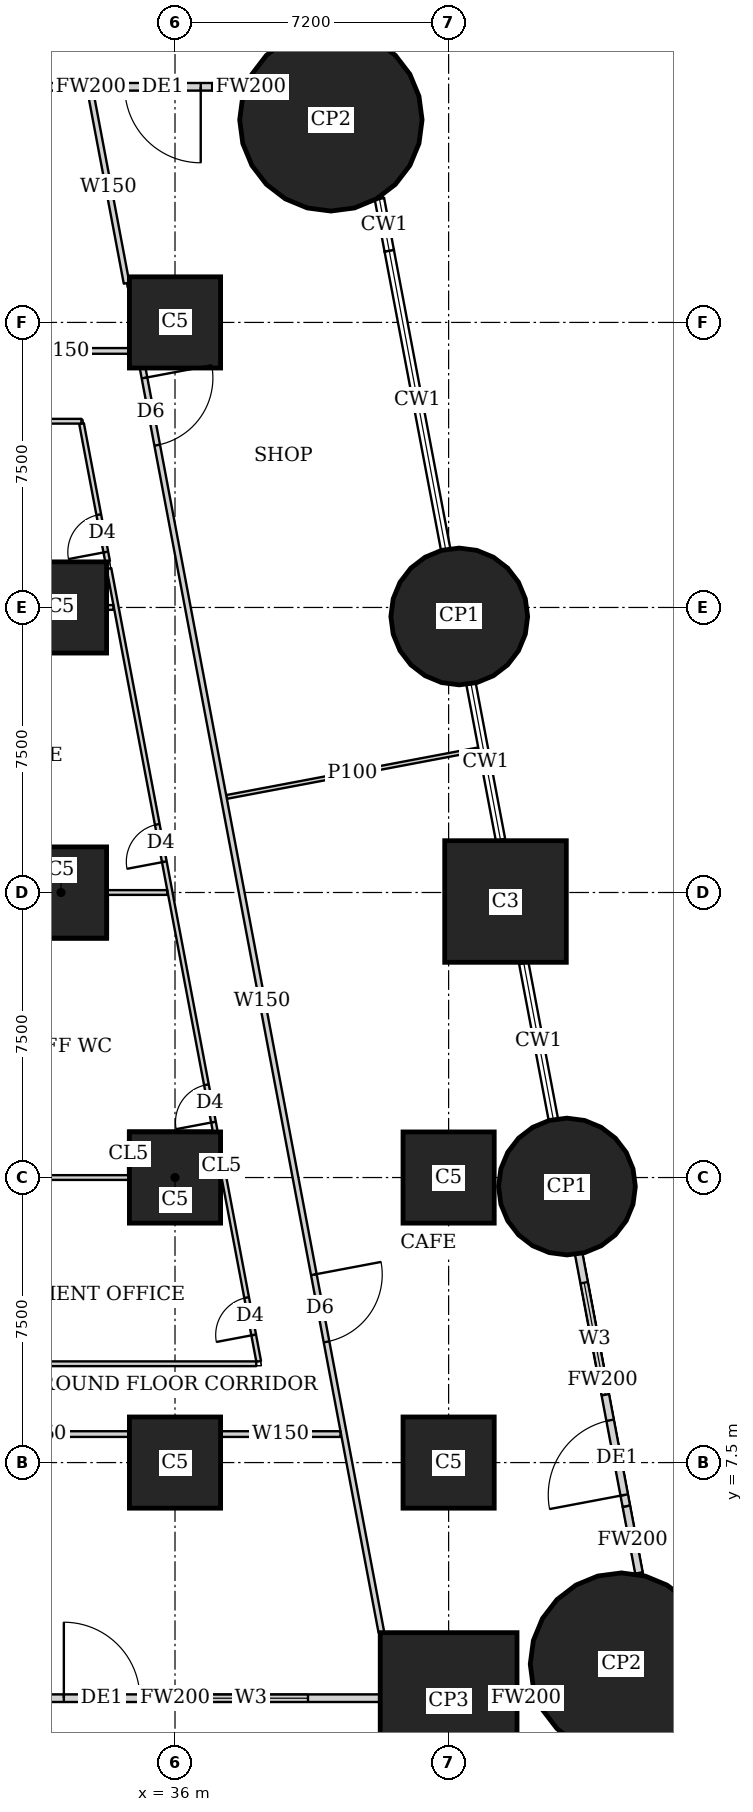
"""IFC4 building model, lengths in metres.
Left out: names, types, materials, properties, quantities, classifications, styles, units other than length and angle.
Written with IfcOpenShell. Run it as: python <this file> out.ifc"""

import sys

from ifc_helpers import new_model, si_unit, direction, frame, frame_2d, origin, origin_2d, place, context, subcontext, project, spatial, rectangle, circle, extrude, element, fill, save


model = new_model("IFC4")
c1 = context("Model", 3, precision=1e-05, world=origin(), true_north=direction((0.0, 1.0)))
c2 = subcontext(c1, "Body", "Model", "MODEL_VIEW")
j1 = project(units=[si_unit("LENGTHUNIT", "METRE"), si_unit("PLANEANGLEUNIT", "RADIAN")], contexts=[c1])
p1 = place(None, origin())
s1 = spatial("IfcSite", under=j1, at=p1, CompositionType="ELEMENT")
p2 = place(p1, origin())
s2 = spatial("IfcBuilding", under=s1, at=p2, CompositionType="ELEMENT")
p3 = place(p2, origin())
s3 = spatial("IfcBuildingStorey", under=s2, at=p3, CompositionType="ELEMENT", Elevation=0.0)
p4 = place(p3, frame((43.2, 1.225, 0.0), z_axis=(0.0, 0.0, 1.0), x_axis=(1.0, 0.0, 0.0)))
e1 = element("IfcColumn", 1, at=p4, inside=s3, PredefinedType="COLUMN", context=c2, shape_type="SweptSolid", body=[
    extrude(rectangle(XDim=3.6, YDim=3.6, at=origin_2d()), origin(), (0.0, 0.0, 1.0), 5.6),
])
p5 = place(p3, frame((47.748, 2.197, 0.0), z_axis=(0.0, 0.0, 1.0), x_axis=(1.0, 0.0, 0.0)))
e2 = element("IfcColumn", 2, at=p5, inside=s3, PredefinedType="COLUMN", context=c2, shape_type="SweptSolid", body=[
    extrude(circle(Radius=2.4, at=origin_2d()), origin(), (0.0, 0.0, 1.0), 5.6),
])
for number, where, z_axis, x_axis in (
    (3, (36.0, 7.5, 0.0), (0.0, 0.0, 1.0), (1.0, 0.0, 0.0)),
    (4, (43.2, 7.5, 0.0), (0.0, 0.0, 1.0), (1.0, 0.0, 0.0)),
    (5, (36.0, 15.0, 0.0), (0.0, 0.0, 1.0), (1.0, 0.0, 0.0)),
    (6, (43.2, 15.0, 0.0), (0.0, 0.0, 1.0), (1.0, 0.0, 0.0)),
):
    element("IfcColumn", number, at=place(p3, frame(where, z_axis=z_axis, x_axis=x_axis)), inside=s3, PredefinedType="COLUMN", context=c2, shape_type="SweptSolid", body=[
        extrude(rectangle(XDim=2.4, YDim=2.4, at=origin_2d()), origin(), (0.0, 0.0, 1.0), 5.6),
    ])
p6 = place(p3, frame((46.314, 14.763, 0.0), z_axis=(0.0, 0.0, 1.0), x_axis=(1.0, 0.0, 0.0)))
e7 = element("IfcColumn", 7, at=p6, inside=s3, PredefinedType="COLUMN", context=c2, shape_type="SweptSolid", body=[
    extrude(circle(Radius=1.8, at=origin_2d()), origin(), (0.0, 0.0, 1.0), 5.6),
])
p7 = place(p3, frame((33.0, 22.5, 0.0), z_axis=(0.0, 0.0, 1.0), x_axis=(1.0, 0.0, 0.0)))
e8 = element("IfcColumn", 8, at=p7, inside=s3, PredefinedType="COLUMN", context=c2, shape_type="SweptSolid", body=[
    extrude(rectangle(XDim=2.4, YDim=2.4, at=origin_2d()), origin(), (0.0, 0.0, 1.0), 5.6),
])
p8 = place(p3, frame((44.697, 22.263, 0.0), z_axis=(0.0, 0.0, 1.0), x_axis=(1.0, 0.0, 0.0)))
e9 = element("IfcColumn", 9, at=p8, inside=s3, PredefinedType="COLUMN", context=c2, shape_type="SweptSolid", body=[
    extrude(rectangle(XDim=3.2, YDim=3.2, at=origin_2d()), origin(), (0.0, 0.0, 1.0), 5.6),
])
p9 = place(p3, frame((33.0, 30.0, 0.0), z_axis=(0.0, 0.0, 1.0), x_axis=(1.0, 0.0, 0.0)))
e10 = element("IfcColumn", 10, at=p9, inside=s3, PredefinedType="COLUMN", context=c2, shape_type="SweptSolid", body=[
    extrude(rectangle(XDim=2.4, YDim=2.4, at=origin_2d()), origin(), (0.0, 0.0, 1.0), 5.6),
])
p10 = place(p3, frame((43.48, 29.763, 0.0), z_axis=(0.0, 0.0, 1.0), x_axis=(1.0, 0.0, 0.0)))
e11 = element("IfcColumn", 11, at=p10, inside=s3, PredefinedType="COLUMN", context=c2, shape_type="SweptSolid", body=[
    extrude(circle(Radius=1.8, at=origin_2d()), origin(), (0.0, 0.0, 1.0), 5.6),
])
p11 = place(p3, frame((36.0, 37.5, 0.0), z_axis=(0.0, 0.0, 1.0), x_axis=(1.0, 0.0, 0.0)))
e12 = element("IfcColumn", 12, at=p11, inside=s3, PredefinedType="COLUMN", context=c2, shape_type="SweptSolid", body=[
    extrude(rectangle(XDim=2.4, YDim=2.4, at=origin_2d()), origin(), (0.0, 0.0, 1.0), 5.6),
])
p12 = place(p3, frame((40.102, 42.83, 0.0), z_axis=(0.0, 0.0, 1.0), x_axis=(1.0, 0.0, 0.0)))
e13 = element("IfcColumn", 13, at=p12, inside=s3, PredefinedType="COLUMN", context=c2, shape_type="SweptSolid", body=[
    extrude(circle(Radius=2.4, at=origin_2d()), origin(), (0.0, 0.0, 1.0), 5.6),
])
p13 = place(p3, frame((30.601, 1.3, 0.0), z_axis=(0.0, 0.0, 1.0), x_axis=(1.0, 0.0, 0.0)))
e14 = element("IfcWall", 14, at=p13, inside=s3, PredefinedType="SOLIDWALL", context=c2, shape_type="SweptSolid", body=[
    extrude(rectangle(XDim=10.798, YDim=0.2, at=frame_2d((5.399, 0.0))), origin(), (0.0, 0.0, 1.0), 3.5),
])
p14 = place(p13, frame((2.474, 0.0, 0.0)))
e15 = element("IfcOpeningElement", 15, at=p14, cuts=e14, PredefinedType="OPENING", context=c2, shape_type="SweptSolid", body=[
    extrude(rectangle(XDim=2.0, YDim=2.4, at=frame_2d((1.0, 1.2))), frame((0.0, 0.11, 0.0), z_axis=(0.0, -1.0, 0.0), x_axis=(1.0, 0.0, 0.0)), (0.0, 0.0, 1.0), 0.22),
])
p15 = place(p13, frame((5.899, 0.0, 0.3)))
e16 = element("IfcOpeningElement", 16, at=p15, cuts=e14, PredefinedType="OPENING", context=c2, shape_type="SweptSolid", body=[
    extrude(rectangle(XDim=3.0, YDim=3.1, at=frame_2d((1.5, 1.55))), frame((0.0, 0.11, 0.0), z_axis=(0.0, -1.0, 0.0), x_axis=(1.0, 0.0, 0.0)), (0.0, 0.0, 1.0), 0.22),
])
p16 = place(p3, frame((45.001, 1.3, 0.0), z_axis=(0.0, 0.0, 1.0), x_axis=(1.0, 0.0, 0.0)))
e17 = element("IfcWall", 17, at=p16, inside=s3, PredefinedType="SOLIDWALL", context=c2, shape_type="SweptSolid", body=[
    extrude(rectangle(XDim=0.474, YDim=0.2, at=frame_2d((0.237, 0.0))), origin(), (0.0, 0.0, 1.0), 5.3),
])
p17 = place(p3, frame((48.209, 4.597, 0.0), z_axis=(0.0, 0.0, 1.0), x_axis=(-0.18578117006, 0.982591144297, 0.0)))
e18 = element("IfcWall", 18, at=p17, inside=s3, PredefinedType="SOLIDWALL", context=c2, shape_type="SweptSolid", body=[
    extrude(rectangle(XDim=1.787, YDim=0.2, at=frame_2d((0.894, 0.0))), origin(), (0.0, 0.0, 1.0), 5.3),
])
p18 = place(p3, frame((47.877, 6.353, 0.0), z_axis=(0.0, 0.0, 1.0), x_axis=(-0.185530368296, 0.982638530916, 0.0)))
e19 = element("IfcWall", 19, at=p18, inside=s3, PredefinedType="SOLIDWALL", context=c2, shape_type="SweptSolid", body=[
    extrude(rectangle(XDim=6.753, YDim=0.2, at=frame_2d((3.376, 0.0))), origin(), (0.0, 0.0, 1.0), 3.5),
])
p19 = place(p18, frame((0.3, 0.0, 0.0)))
e20 = element("IfcOpeningElement", 20, at=p19, cuts=e19, PredefinedType="OPENING", context=c2, shape_type="SweptSolid", body=[
    extrude(rectangle(XDim=2.0, YDim=2.4, at=frame_2d((1.0, 1.2))), frame((0.0, 0.11, 0.0), z_axis=(0.0, -1.0, 0.0), x_axis=(1.0, 0.0, 0.0)), (0.0, 0.0, 1.0), 0.22),
])
p20 = place(p18, frame((2.983, 0.0, 0.3)))
e21 = element("IfcOpeningElement", 21, at=p20, cuts=e19, PredefinedType="OPENING", context=c2, shape_type="SweptSolid", body=[
    extrude(rectangle(XDim=3.0, YDim=3.1, at=frame_2d((1.5, 1.55))), frame((0.0, 0.11, 0.0), z_axis=(0.0, -1.0, 0.0), x_axis=(1.0, 0.0, 0.0)), (0.0, 0.0, 1.0), 0.22),
])
p21 = place(p3, frame((37.82, 43.7, 0.0), z_axis=(0.0, 0.0, 1.0), x_axis=(-1.0, 0.0, 0.0)))
e22 = element("IfcWall", 22, at=p21, inside=s3, PredefinedType="SOLIDWALL", context=c2, shape_type="SweptSolid", body=[
    extrude(rectangle(XDim=0.843, YDim=0.2, at=frame_2d((0.421, 0.0))), origin(), (0.0, 0.0, 1.0), 5.3),
])
p22 = place(p3, frame((36.977, 43.7, 0.0), z_axis=(0.0, 0.0, 1.0), x_axis=(-1.0, 0.0, 0.0)))
e23 = element("IfcWall", 23, at=p22, inside=s3, PredefinedType="SOLIDWALL", context=c2, shape_type="SweptSolid", body=[
    extrude(rectangle(XDim=6.376, YDim=0.2, at=frame_2d((3.188, 0.0))), origin(), (0.0, 0.0, 1.0), 3.5),
])
p23 = place(p22, frame((0.3, 0.0, 0.0)))
e24 = element("IfcOpeningElement", 24, at=p23, cuts=e23, PredefinedType="OPENING", context=c2, shape_type="SweptSolid", body=[
    extrude(rectangle(XDim=2.0, YDim=2.4, at=frame_2d((1.0, 1.2))), frame((0.0, 0.11, 0.0), z_axis=(0.0, -1.0, 0.0), x_axis=(1.0, 0.0, 0.0)), (0.0, 0.0, 1.0), 0.22),
])
p24 = place(p3, frame((40.355, 8.25, 0.0), z_axis=(0.0, 0.0, 1.0), x_axis=(-1.0, 0.0, 0.0)))
e25 = element("IfcWall", 25, at=p24, inside=s3, PredefinedType="SOLIDWALL", context=c2, shape_type="SweptSolid", body=[
    extrude(rectangle(XDim=3.154, YDim=0.15, at=frame_2d((1.577, 0.0))), origin(), (0.0, 0.0, 1.0), 3.7),
])
p25 = place(p3, frame((34.799, 8.25, 0.0), z_axis=(0.0, 0.0, 1.0), x_axis=(-1.0, 0.0, 0.0)))
e26 = element("IfcWall", 26, at=p25, inside=s3, PredefinedType="SOLIDWALL", context=c2, shape_type="SweptSolid", body=[
    extrude(rectangle(XDim=4.798, YDim=0.15, at=frame_2d((2.399, 0.0))), origin(), (0.0, 0.0, 1.0), 3.7),
])
p26 = place(p3, frame((30.001, 36.75, 0.0), z_axis=(0.0, 0.0, 1.0), x_axis=(1.0, 0.0, 0.0)))
e27 = element("IfcWall", 27, at=p26, inside=s3, PredefinedType="SOLIDWALL", context=c2, shape_type="SweptSolid", body=[
    extrude(rectangle(XDim=4.798, YDim=0.15, at=frame_2d((2.399, 0.0))), origin(), (0.0, 0.0, 1.0), 3.7),
])
p27 = place(p26, frame((0.15, 0.0, 0.0)))
e28 = element("IfcOpeningElement", 28, at=p27, cuts=e27, PredefinedType="OPENING", context=c2, shape_type="SweptSolid", body=[
    extrude(rectangle(XDim=1.8, YDim=2.1, at=frame_2d((0.9, 1.05))), frame((0.0, 0.085, 0.0), z_axis=(0.0, -1.0, 0.0), x_axis=(1.0, 0.0, 0.0)), (0.0, 0.0, 1.0), 0.17),
])
p28 = place(p3, frame((33.769, 43.6, 0.0), z_axis=(0.0, 0.0, 1.0), x_axis=(0.185588997398, -0.98262745944, 0.0)))
e29 = element("IfcWall", 29, at=p28, inside=s3, PredefinedType="SOLIDWALL", context=c2, shape_type="SweptSolid", body=[
    extrude(rectangle(XDim=5.157, YDim=0.15, at=frame_2d((2.578, 0.0))), origin(), (0.0, 0.0, 1.0), 3.5),
])
p29 = place(p3, frame((35.151, 36.285, 0.0), z_axis=(0.0, 0.0, 1.0), x_axis=(0.185575970071, -0.982629919823, 0.0)))
e30 = element("IfcWall", 30, at=p29, inside=s3, PredefinedType="SOLIDWALL", context=c2, shape_type="SweptSolid", body=[
    extrude(rectangle(XDim=33.841, YDim=0.15, at=frame_2d((16.92, 0.0))), origin(), (0.0, 0.0, 1.0), 3.7),
])
p30 = place(p29, frame((0.25, 0.0, 0.0)))
e31 = element("IfcOpeningElement", 31, at=p30, cuts=e30, PredefinedType="OPENING", context=c2, shape_type="SweptSolid", body=[
    extrude(rectangle(XDim=1.8, YDim=2.1, at=frame_2d((0.9, 1.05))), frame((0.0, 0.085, 0.0), z_axis=(0.0, -1.0, 0.0), x_axis=(1.0, 0.0, 0.0)), (0.0, 0.0, 1.0), 0.17),
])
p31 = place(p29, frame((24.261, 0.0, 0.0)))
e32 = element("IfcOpeningElement", 32, at=p31, cuts=e30, PredefinedType="OPENING", context=c2, shape_type="SweptSolid", body=[
    extrude(rectangle(XDim=1.8, YDim=2.1, at=frame_2d((0.9, 1.05))), frame((0.0, 0.085, 0.0), z_axis=(0.0, -1.0, 0.0), x_axis=(1.0, 0.0, 0.0)), (0.0, 0.0, 1.0), 0.17),
])
p32 = place(p3, frame((43.988, 26.267, 0.0), z_axis=(0.0, 0.0, 1.0), x_axis=(-0.982612004876, -0.185670805118, 0.0)))
e33 = element("IfcWall", 33, at=p32, inside=s3, PredefinedType="PARTITIONING", context=c2, shape_type="SweptSolid", body=[
    extrude(rectangle(XDim=6.75, YDim=0.1, at=frame_2d((3.375, 0.0))), origin(), (0.0, 0.0, 1.0), 3.5),
])
p33 = place(p3, frame((28.95, 10.1, 0.0), z_axis=(0.0, 0.0, 1.0), x_axis=(1.0, 0.0, 0.0)))
e34 = element("IfcWall", 34, at=p33, inside=s3, PredefinedType="PARTITIONING", context=c2, shape_type="SweptSolid", body=[
    extrude(rectangle(XDim=9.188, YDim=0.125, at=frame_2d((4.594, 0.0))), origin(), (0.0, 0.0, 1.0), 3.3),
])
p34 = place(p3, frame((28.95, 34.9, 0.0), z_axis=(0.0, 0.0, 1.0), x_axis=(1.0, 0.0, 0.0)))
e35 = element("IfcWall", 35, at=p34, inside=s3, PredefinedType="PARTITIONING", context=c2, shape_type="SweptSolid", body=[
    extrude(rectangle(XDim=4.588, YDim=0.125, at=frame_2d((2.294, 0.0))), origin(), (0.0, 0.0, 1.0), 3.3),
])
p35 = place(p3, frame((38.202, 10.163, 0.0), z_axis=(0.0, 0.0, 1.0), x_axis=(-0.185539561605, 0.982636795097, 0.0)))
e36 = element("IfcWall", 36, at=p35, inside=s3, PredefinedType="PARTITIONING", context=c2, shape_type="SweptSolid", body=[
    extrude(rectangle(XDim=5.066, YDim=0.125, at=frame_2d((2.533, 0.0))), origin(), (0.0, 0.0, 1.0), 3.7),
])
p36 = place(p35, frame((0.708, 0.0, 0.0)))
e37 = element("IfcOpeningElement", 37, at=p36, cuts=e36, PredefinedType="OPENING", context=c2, shape_type="SweptSolid", body=[
    extrude(rectangle(XDim=1.0, YDim=2.1, at=frame_2d((0.5, 1.05))), frame((0.0, 0.073, 0.0), z_axis=(0.0, -1.0, 0.0), x_axis=(1.0, 0.0, 0.0)), (0.0, 0.0, 1.0), 0.145),
])
p37 = place(p3, frame((37.059, 16.213, 0.0), z_axis=(0.0, 0.0, 1.0), x_axis=(-0.185585225745, 0.982628171785, 0.0)))
e38 = element("IfcWall", 38, at=p37, inside=s3, PredefinedType="PARTITIONING", context=c2, shape_type="SweptSolid", body=[
    extrude(rectangle(XDim=15.072, YDim=0.125, at=frame_2d((7.536, 0.0))), origin(), (0.0, 0.0, 1.0), 3.7),
])
p38 = place(p37, frame((0.25, 0.0, 0.0)))
e39 = element("IfcOpeningElement", 39, at=p38, cuts=e38, PredefinedType="OPENING", context=c2, shape_type="SweptSolid", body=[
    extrude(rectangle(XDim=1.0, YDim=2.1, at=frame_2d((0.5, 1.05))), frame((0.0, 0.073, 0.0), z_axis=(0.0, -1.0, 0.0), x_axis=(1.0, 0.0, 0.0)), (0.0, 0.0, 1.0), 0.145),
])
p39 = place(p37, frame((7.221, 0.0, 0.0)))
e40 = element("IfcOpeningElement", 40, at=p39, cuts=e38, PredefinedType="OPENING", context=c2, shape_type="SweptSolid", body=[
    extrude(rectangle(XDim=1.0, YDim=2.1, at=frame_2d((0.5, 1.05))), frame((0.0, 0.073, 0.0), z_axis=(0.0, -1.0, 0.0), x_axis=(1.0, 0.0, 0.0)), (0.0, 0.0, 1.0), 0.145),
])
p40 = place(p3, frame((34.226, 31.213, 0.0), z_axis=(0.0, 0.0, 1.0), x_axis=(-0.185694811189, 0.982607468472, 0.0)))
e41 = element("IfcWall", 41, at=p40, inside=s3, PredefinedType="PARTITIONING", context=c2, shape_type="SweptSolid", body=[
    extrude(rectangle(XDim=3.689, YDim=0.125, at=frame_2d((1.845, 0.0))), origin(), (0.0, 0.0, 1.0), 5.3),
])
p41 = place(p40, frame((0.25, 0.0, 0.0)))
e42 = element("IfcOpeningElement", 42, at=p41, cuts=e41, PredefinedType="OPENING", context=c2, shape_type="SweptSolid", body=[
    extrude(rectangle(XDim=1.0, YDim=2.1, at=frame_2d((0.5, 1.05))), frame((0.0, 0.073, 0.0), z_axis=(0.0, -1.0, 0.0), x_axis=(1.0, 0.0, 0.0)), (0.0, 0.0, 1.0), 0.145),
])
p42 = place(p3, frame((29.25, 15.0, 0.0), z_axis=(0.0, 0.0, 1.0), x_axis=(1.0, 0.0, 0.0)))
e43 = element("IfcWall", 43, at=p42, inside=s3, PredefinedType="PARTITIONING", context=c2, shape_type="SweptSolid", body=[
    extrude(rectangle(XDim=5.549, YDim=0.125, at=frame_2d((2.774, 0.0))), origin(), (0.0, 0.0, 1.0), 5.3),
])
p43 = place(p3, frame((34.201, 22.5, 0.0), z_axis=(0.0, 0.0, 1.0), x_axis=(1.0, 0.0, 0.0)))
e44 = element("IfcWall", 44, at=p43, inside=s3, PredefinedType="PARTITIONING", context=c2, shape_type="SweptSolid", body=[
    extrude(rectangle(XDim=1.595, YDim=0.125, at=frame_2d((0.797, 0.0))), origin(), (0.0, 0.0, 1.0), 3.7),
])
p44 = place(p3, frame((34.201, 30.0, 0.0), z_axis=(0.0, 0.0, 1.0), x_axis=(1.0, 0.0, 0.0)))
e45 = element("IfcWall", 45, at=p44, inside=s3, PredefinedType="PARTITIONING", context=c2, shape_type="SweptSolid", body=[
    extrude(rectangle(XDim=0.178, YDim=0.125, at=frame_2d((0.089, 0.0))), origin(), (0.0, 0.0, 1.0), 3.7),
])
p45 = place(p14, origin())
e46 = element("IfcDoor", 46, at=p45, inside=s3, OperationType="DOUBLE_DOOR_SINGLE_SWING", PredefinedType="DOOR", context=c2, shape_type="SweptSolid", body=[
    extrude(rectangle(XDim=2.0, YDim=2.4, at=frame_2d((1.0, 1.2))), frame((0.0, 0.025, 0.0), z_axis=(0.0, -1.0, 0.0), x_axis=(1.0, 0.0, 0.0)), (0.0, 0.0, 1.0), 0.05),
])
fill(e15, e46)
p46 = place(p15, origin())
e47 = element("IfcWindow", 47, at=p46, inside=s3, PartitioningType="SINGLE_PANEL", PredefinedType="WINDOW", context=c2, shape_type="SweptSolid", body=[
    extrude(rectangle(XDim=3.0, YDim=3.1, at=frame_2d((1.5, 1.55))), frame((0.0, 0.03, 0.0), z_axis=(0.0, -1.0, 0.0), x_axis=(1.0, 0.0, 0.0)), (0.0, 0.0, 1.0), 0.06),
])
fill(e16, e47)
p47 = place(p19, origin())
e48 = element("IfcDoor", 48, at=p47, inside=s3, OperationType="DOUBLE_DOOR_SINGLE_SWING", PredefinedType="DOOR", context=c2, shape_type="SweptSolid", body=[
    extrude(rectangle(XDim=2.0, YDim=2.4, at=frame_2d((1.0, 1.2))), frame((0.0, 0.025, 0.0), z_axis=(0.0, -1.0, 0.0), x_axis=(1.0, 0.0, 0.0)), (0.0, 0.0, 1.0), 0.05),
])
fill(e20, e48)
p48 = place(p20, origin())
e49 = element("IfcWindow", 49, at=p48, inside=s3, PartitioningType="SINGLE_PANEL", PredefinedType="WINDOW", context=c2, shape_type="SweptSolid", body=[
    extrude(rectangle(XDim=3.0, YDim=3.1, at=frame_2d((1.5, 1.55))), frame((0.0, 0.03, 0.0), z_axis=(0.0, -1.0, 0.0), x_axis=(1.0, 0.0, 0.0)), (0.0, 0.0, 1.0), 0.06),
])
fill(e21, e49)
p49 = place(p23, origin())
e50 = element("IfcDoor", 50, at=p49, inside=s3, OperationType="DOUBLE_DOOR_SINGLE_SWING", PredefinedType="DOOR", context=c2, shape_type="SweptSolid", body=[
    extrude(rectangle(XDim=2.0, YDim=2.4, at=frame_2d((1.0, 1.2))), frame((0.0, 0.025, 0.0), z_axis=(0.0, -1.0, 0.0), x_axis=(1.0, 0.0, 0.0)), (0.0, 0.0, 1.0), 0.05),
])
fill(e24, e50)
p50 = place(p30, origin())
e51 = element("IfcDoor", 51, at=p50, inside=s3, OperationType="DOUBLE_DOOR_SINGLE_SWING", PredefinedType="DOOR", context=c2, shape_type="SweptSolid", body=[
    extrude(rectangle(XDim=1.8, YDim=2.1, at=frame_2d((0.9, 1.05))), frame((0.0, 0.025, 0.0), z_axis=(0.0, -1.0, 0.0), x_axis=(1.0, 0.0, 0.0)), (0.0, 0.0, 1.0), 0.05),
])
fill(e31, e51)
p51 = place(p31, origin())
e52 = element("IfcDoor", 52, at=p51, inside=s3, OperationType="DOUBLE_DOOR_SINGLE_SWING", PredefinedType="DOOR", context=c2, shape_type="SweptSolid", body=[
    extrude(rectangle(XDim=1.8, YDim=2.1, at=frame_2d((0.9, 1.05))), frame((0.0, 0.025, 0.0), z_axis=(0.0, -1.0, 0.0), x_axis=(1.0, 0.0, 0.0)), (0.0, 0.0, 1.0), 0.05),
])
fill(e32, e52)
p52 = place(p36, origin())
e53 = element("IfcDoor", 53, at=p52, inside=s3, OperationType="SINGLE_SWING_LEFT", PredefinedType="DOOR", context=c2, shape_type="SweptSolid", body=[
    extrude(rectangle(XDim=1.0, YDim=2.1, at=frame_2d((0.5, 1.05))), frame((0.0, 0.025, 0.0), z_axis=(0.0, -1.0, 0.0), x_axis=(1.0, 0.0, 0.0)), (0.0, 0.0, 1.0), 0.05),
])
fill(e37, e53)
p53 = place(p38, origin())
e54 = element("IfcDoor", 54, at=p53, inside=s3, OperationType="SINGLE_SWING_LEFT", PredefinedType="DOOR", context=c2, shape_type="SweptSolid", body=[
    extrude(rectangle(XDim=1.0, YDim=2.1, at=frame_2d((0.5, 1.05))), frame((0.0, 0.025, 0.0), z_axis=(0.0, -1.0, 0.0), x_axis=(1.0, 0.0, 0.0)), (0.0, 0.0, 1.0), 0.05),
])
fill(e39, e54)
p54 = place(p39, origin())
e55 = element("IfcDoor", 55, at=p54, inside=s3, OperationType="SINGLE_SWING_LEFT", PredefinedType="DOOR", context=c2, shape_type="SweptSolid", body=[
    extrude(rectangle(XDim=1.0, YDim=2.1, at=frame_2d((0.5, 1.05))), frame((0.0, 0.025, 0.0), z_axis=(0.0, -1.0, 0.0), x_axis=(1.0, 0.0, 0.0)), (0.0, 0.0, 1.0), 0.05),
])
fill(e40, e55)
p55 = place(p41, origin())
e56 = element("IfcDoor", 56, at=p55, inside=s3, OperationType="SINGLE_SWING_LEFT", PredefinedType="DOOR", context=c2, shape_type="SweptSolid", body=[
    extrude(rectangle(XDim=1.0, YDim=2.1, at=frame_2d((0.5, 1.05))), frame((0.0, 0.025, 0.0), z_axis=(0.0, -1.0, 0.0), x_axis=(1.0, 0.0, 0.0)), (0.0, 0.0, 1.0), 0.05),
])
fill(e42, e56)
save(model, sys.argv[1])
